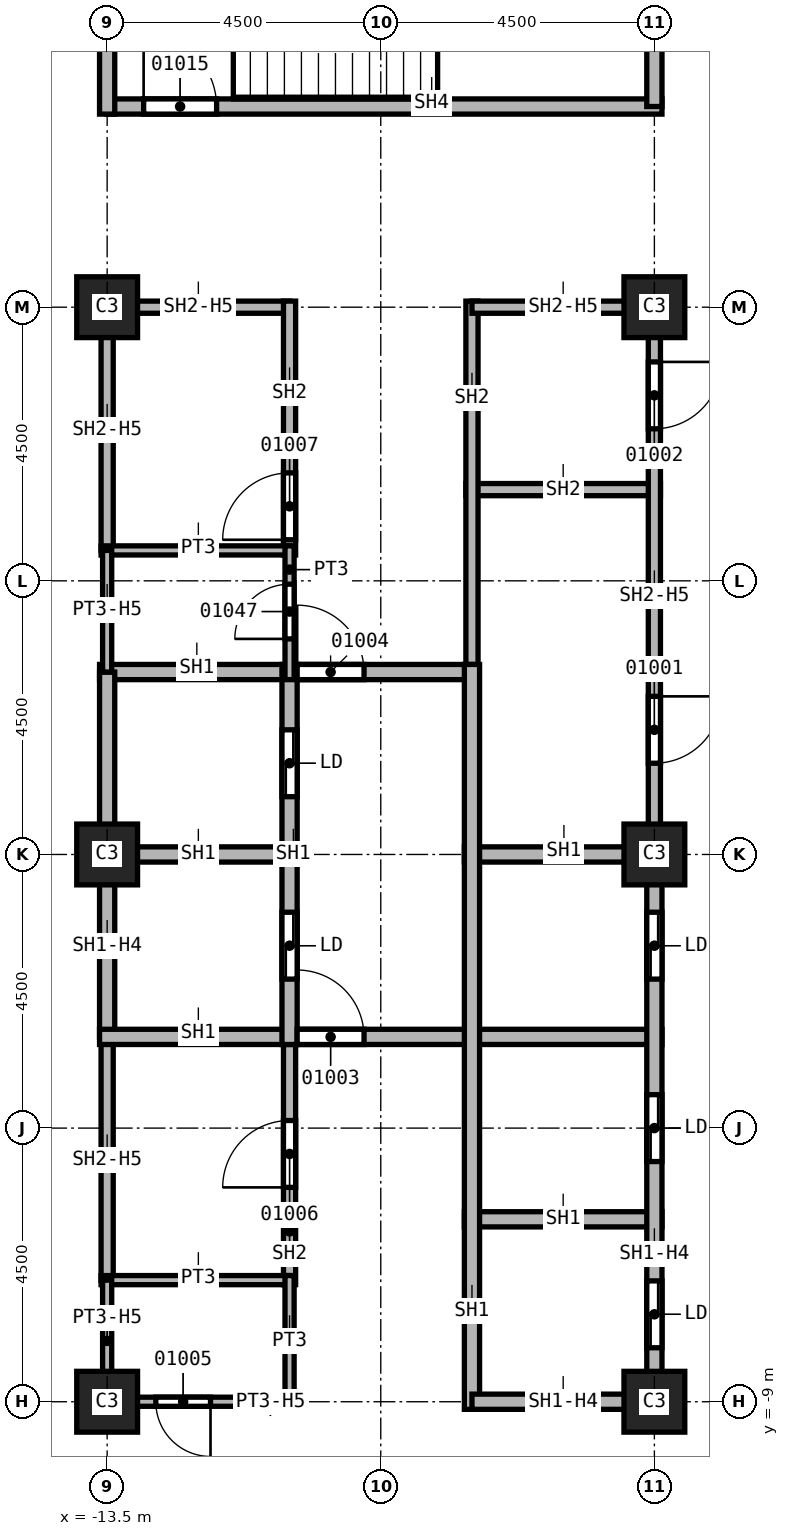
"""IFC4 building model, lengths in metres.
Left out: names, types, materials, properties, quantities, classifications, styles, units other than length and angle.
Written with IfcOpenShell. Run it as: python <this file> out.ifc"""

import sys

from ifc_helpers import new_model, si_unit, direction, frame, frame_2d, origin, origin_2d, place, context, subcontext, project, spatial, rectangle, extrude, element, fill, save


model = new_model("IFC4")
c1 = context("Model", 3, precision=1e-05, world=origin(), true_north=direction((0.0, 1.0)))
c2 = subcontext(c1, "Body", "Model", "MODEL_VIEW")
j1 = project(units=[si_unit("LENGTHUNIT", "METRE"), si_unit("PLANEANGLEUNIT", "RADIAN")], contexts=[c1])
p1 = place(None, origin())
s1 = spatial("IfcSite", under=j1, at=p1, CompositionType="ELEMENT")
p2 = place(p1, origin())
s2 = spatial("IfcBuilding", under=s1, at=p2, CompositionType="ELEMENT")
p3 = place(p2, frame((0.0, 0.0, 72.0)))
s3 = spatial("IfcBuildingStorey", under=s2, at=p3, CompositionType="ELEMENT", Elevation=72.0)
for number, where, z_axis, x_axis in (
    (1, (-4.5, 0.0, 0.0), (0.0, 0.0, 1.0), (1.0, 0.0, 0.0)),
    (2, (-4.5, 9.0, 0.0), (0.0, 0.0, 1.0), (1.0, 0.0, 0.0)),
    (3, (-4.5, -9.0, 0.0), (0.0, 0.0, 1.0), (1.0, 0.0, 0.0)),
    (4, (-13.5, 0.0, 0.0), (0.0, 0.0, 1.0), (1.0, 0.0, 0.0)),
    (5, (-13.5, 9.0, 0.0), (0.0, 0.0, 1.0), (1.0, 0.0, 0.0)),
    (6, (-13.5, -9.0, 0.0), (0.0, 0.0, 1.0), (1.0, 0.0, 0.0)),
):
    element("IfcColumn", number, at=place(p3, frame(where, z_axis=z_axis, x_axis=x_axis)), inside=s3, PredefinedType="COLUMN", context=c2, shape_type="SweptSolid", body=[
        extrude(rectangle(XDim=1.0, YDim=1.0, at=origin_2d()), origin(), (0.0, 0.0, 1.0), 3.7),
    ])
p4 = place(p3, frame((-13.5, -7.0, 0.0), z_axis=(0.0, 0.0, 1.0), x_axis=(0.0, 1.0, 0.0)))
e7 = element("IfcWall", 7, at=p4, inside=s3, PredefinedType="SOLIDWALL", context=c2, shape_type="SweptSolid", body=[
    extrude(rectangle(XDim=4.0, YDim=0.2, at=frame_2d((2.0, 0.0))), origin(), (0.0, 0.0, 1.0), 2.938),
])
p5 = place(p3, frame((-13.5, 5.0, 0.0), z_axis=(0.0, 0.0, 1.0), x_axis=(0.0, 1.0, 0.0)))
e8 = element("IfcWall", 8, at=p5, inside=s3, PredefinedType="SOLIDWALL", context=c2, shape_type="SweptSolid", body=[
    extrude(rectangle(XDim=4.1, YDim=0.2, at=frame_2d((2.05, 0.0))), origin(), (0.0, 0.0, 1.0), 2.938),
])
p6 = place(p3, frame((-13.5, 9.0, 0.0), z_axis=(0.0, 0.0, 1.0), x_axis=(1.0, 0.0, 0.0)))
e9 = element("IfcWall", 9, at=p6, inside=s3, PredefinedType="SOLIDWALL", context=c2, shape_type="SweptSolid", body=[
    extrude(rectangle(XDim=3.0, YDim=0.2, at=frame_2d((1.5, 0.0))), origin(), (0.0, 0.0, 1.0), 2.938),
])
p7 = place(p3, frame((-10.5, -7.075, 0.0), z_axis=(0.0, 0.0, 1.0), x_axis=(0.0, 1.0, 0.0)))
e10 = element("IfcWall", 10, at=p7, inside=s3, PredefinedType="SOLIDWALL", context=c2, shape_type="SweptSolid", body=[
    extrude(rectangle(XDim=4.2, YDim=0.2, at=frame_2d((2.1, 0.0))), origin(), (0.0, 0.0, 1.0), 3.7),
])
p8 = place(p7, frame((1.6, 0.0, 0.0)))
e11 = element("IfcOpeningElement", 11, at=p8, cuts=e10, PredefinedType="OPENING", context=c2, shape_type="SweptSolid", body=[
    extrude(rectangle(XDim=1.1, YDim=2.1, at=frame_2d((0.55, 1.05))), frame((0.0, 0.1, 0.0), z_axis=(0.0, -1.0, 0.0), x_axis=(1.0, 0.0, 0.0)), (0.0, 0.0, 1.0), 0.2),
])
p9 = place(p3, frame((-10.5, 4.925, 0.0), z_axis=(0.0, 0.0, 1.0), x_axis=(0.0, 1.0, 0.0)))
e12 = element("IfcWall", 12, at=p9, inside=s3, PredefinedType="SOLIDWALL", context=c2, shape_type="SweptSolid", body=[
    extrude(rectangle(XDim=4.175, YDim=0.2, at=frame_2d((2.087, 0.0))), origin(), (0.0, 0.0, 1.0), 3.7),
])
p10 = place(p9, frame((0.25, 0.0, 0.0)))
e13 = element("IfcOpeningElement", 13, at=p10, cuts=e12, PredefinedType="OPENING", context=c2, shape_type="SweptSolid", body=[
    extrude(rectangle(XDim=1.1, YDim=2.1, at=frame_2d((0.55, 1.05))), frame((0.0, 0.1, 0.0), z_axis=(0.0, -1.0, 0.0), x_axis=(1.0, 0.0, 0.0)), (0.0, 0.0, 1.0), 0.2),
])
p11 = place(p3, frame((-7.6, 6.0, 0.0), z_axis=(0.0, 0.0, 1.0), x_axis=(1.0, 0.0, 0.0)))
e14 = element("IfcWall", 14, at=p11, inside=s3, PredefinedType="SOLIDWALL", context=c2, shape_type="SweptSolid", body=[
    extrude(rectangle(XDim=3.2, YDim=0.2, at=frame_2d((1.6, 0.0))), origin(), (0.0, 0.0, 1.0), 3.7),
])
p12 = place(p3, frame((-7.5, 2.875, 0.0), z_axis=(0.0, 0.0, 1.0), x_axis=(0.0, 1.0, 0.0)))
e15 = element("IfcWall", 15, at=p12, inside=s3, PredefinedType="SOLIDWALL", context=c2, shape_type="SweptSolid", body=[
    extrude(rectangle(XDim=6.225, YDim=0.2, at=frame_2d((3.113, 0.0))), origin(), (0.0, 0.0, 1.0), 3.7),
])
p13 = place(p3, frame((-7.5, 9.0, 0.0), z_axis=(0.0, 0.0, 1.0), x_axis=(1.0, 0.0, 0.0)))
e16 = element("IfcWall", 16, at=p13, inside=s3, PredefinedType="SOLIDWALL", context=c2, shape_type="SweptSolid", body=[
    extrude(rectangle(XDim=3.0, YDim=0.2, at=frame_2d((1.5, 0.0))), origin(), (0.0, 0.0, 1.0), 2.938),
])
p14 = place(p3, frame((-4.5, 9.1, 0.0), z_axis=(0.0, 0.0, 1.0), x_axis=(0.0, -1.0, 0.0)))
e17 = element("IfcWall", 17, at=p14, inside=s3, PredefinedType="SOLIDWALL", context=c2, shape_type="SweptSolid", body=[
    extrude(rectangle(XDim=9.1, YDim=0.2, at=frame_2d((4.55, 0.0))), origin(), (0.0, 0.0, 1.0), 2.938),
])
p15 = place(p14, frame((6.5, 0.0, 0.0)))
e18 = element("IfcOpeningElement", 18, at=p15, cuts=e17, PredefinedType="OPENING", context=c2, shape_type="SweptSolid", body=[
    extrude(rectangle(XDim=1.1, YDim=2.1, at=frame_2d((0.55, 1.05))), frame((0.0, 0.1, 0.0), z_axis=(0.0, -1.0, 0.0), x_axis=(1.0, 0.0, 0.0)), (0.0, 0.0, 1.0), 0.2),
])
p16 = place(p14, frame((1.0, 0.0, 0.0)))
e19 = element("IfcOpeningElement", 19, at=p16, cuts=e17, PredefinedType="OPENING", context=c2, shape_type="SweptSolid", body=[
    extrude(rectangle(XDim=1.1, YDim=2.1, at=frame_2d((0.55, 1.05))), frame((0.0, 0.1, 0.0), z_axis=(0.0, -1.0, 0.0), x_axis=(1.0, 0.0, 0.0)), (0.0, 0.0, 1.0), 0.2),
])
p17 = place(p3, frame((-13.625, 0.0, 0.0), z_axis=(0.0, 0.0, 1.0), x_axis=(1.0, 0.0, 0.0)))
e20 = element("IfcWall", 20, at=p17, inside=s3, PredefinedType="SOLIDWALL", context=c2, shape_type="SweptSolid", body=[
    extrude(rectangle(XDim=3.125, YDim=0.25, at=frame_2d((1.562, 0.0))), origin(), (0.0, 0.0, 1.0), 3.7),
])
p18 = place(p3, frame((-13.625, 3.0, 0.0), z_axis=(0.0, 0.0, 1.0), x_axis=(1.0, 0.0, 0.0)))
e21 = element("IfcWall", 21, at=p18, inside=s3, PredefinedType="SOLIDWALL", context=c2, shape_type="SweptSolid", body=[
    extrude(rectangle(XDim=6.125, YDim=0.25, at=frame_2d((3.062, 0.0))), origin(), (0.0, 0.0, 1.0), 3.7),
])
p19 = place(p18, frame((3.25, 0.0, 0.0)))
e22 = element("IfcOpeningElement", 22, at=p19, cuts=e21, PredefinedType="OPENING", context=c2, shape_type="SweptSolid", body=[
    extrude(rectangle(XDim=1.1, YDim=2.1, at=frame_2d((0.55, 1.05))), frame((0.0, 0.125, 0.0), z_axis=(0.0, -1.0, 0.0), x_axis=(1.0, 0.0, 0.0)), (0.0, 0.0, 1.0), 0.25),
])
p20 = place(p3, frame((-13.5, -3.0, 0.0), z_axis=(0.0, 0.0, 1.0), x_axis=(0.0, 1.0, 0.0)))
e23 = element("IfcWall", 23, at=p20, inside=s3, PredefinedType="SOLIDWALL", context=c2, shape_type="SweptSolid", body=[
    extrude(rectangle(XDim=6.0, YDim=0.25, at=frame_2d((3.0, 0.0))), origin(), (0.0, 0.0, 1.0), 2.938),
])
p21 = place(p3, frame((-13.625, -3.0, 0.0), z_axis=(0.0, 0.0, 1.0), x_axis=(1.0, 0.0, 0.0)))
e24 = element("IfcWall", 24, at=p21, inside=s3, PredefinedType="SOLIDWALL", context=c2, shape_type="SweptSolid", body=[
    extrude(rectangle(XDim=9.25, YDim=0.25, at=frame_2d((4.625, 0.0))), origin(), (0.0, 0.0, 1.0), 3.7),
])
p22 = place(p21, frame((3.25, 0.0, 0.0)))
e25 = element("IfcOpeningElement", 25, at=p22, cuts=e24, PredefinedType="OPENING", context=c2, shape_type="SweptSolid", body=[
    extrude(rectangle(XDim=1.1, YDim=2.1, at=frame_2d((0.55, 1.05))), frame((0.0, 0.125, 0.0), z_axis=(0.0, -1.0, 0.0), x_axis=(1.0, 0.0, 0.0)), (0.0, 0.0, 1.0), 0.25),
])
p23 = place(p3, frame((-10.5, -3.125, 0.0), z_axis=(0.0, 0.0, 1.0), x_axis=(0.0, 1.0, 0.0)))
e26 = element("IfcWall", 26, at=p23, inside=s3, PredefinedType="SOLIDWALL", context=c2, shape_type="SweptSolid", body=[
    extrude(rectangle(XDim=6.25, YDim=0.25, at=frame_2d((3.125, 0.0))), origin(), (0.0, 0.0, 1.0), 3.7),
])
p24 = place(p23, frame((1.075, 0.0, 0.0)))
e27 = element("IfcOpeningElement", 27, at=p24, cuts=e26, PredefinedType="OPENING", context=c2, shape_type="SweptSolid", body=[
    extrude(rectangle(XDim=1.1, YDim=2.1, at=frame_2d((0.55, 1.05))), frame((0.0, 0.125, 0.0), z_axis=(0.0, -1.0, 0.0), x_axis=(1.0, 0.0, 0.0)), (0.0, 0.0, 1.0), 0.25),
])
p25 = place(p23, frame((4.075, 0.0, 0.0)))
e28 = element("IfcOpeningElement", 28, at=p25, cuts=e26, PredefinedType="OPENING", context=c2, shape_type="SweptSolid", body=[
    extrude(rectangle(XDim=1.1, YDim=2.1, at=frame_2d((0.55, 1.05))), frame((0.0, 0.125, 0.0), z_axis=(0.0, -1.0, 0.0), x_axis=(1.0, 0.0, 0.0)), (0.0, 0.0, 1.0), 0.25),
])
for number, where, z_axis, x_axis in (
    (29, (-7.625, -6.0, 0.0), (0.0, 0.0, 1.0), (1.0, 0.0, 0.0)),
    (30, (-7.625, 0.0, 0.0), (0.0, 0.0, 1.0), (1.0, 0.0, 0.0)),
):
    element("IfcWall", number, at=place(p3, frame(where, z_axis=z_axis, x_axis=x_axis)), inside=s3, PredefinedType="SOLIDWALL", context=c2, shape_type="SweptSolid", body=[
        extrude(rectangle(XDim=3.25, YDim=0.25, at=frame_2d((1.625, 0.0))), origin(), (0.0, 0.0, 1.0), 3.7),
    ])
p26 = place(p3, frame((-7.5, -9.125, 0.0), z_axis=(0.0, 0.0, 1.0), x_axis=(0.0, 1.0, 0.0)))
e31 = element("IfcWall", 31, at=p26, inside=s3, PredefinedType="SOLIDWALL", context=c2, shape_type="SweptSolid", body=[
    extrude(rectangle(XDim=12.25, YDim=0.25, at=frame_2d((6.125, 0.0))), origin(), (0.0, 0.0, 1.0), 3.7),
])
p27 = place(p3, frame((-4.5, -9.0, 0.0), z_axis=(0.0, 0.0, 1.0), x_axis=(-1.0, 0.0, 0.0)))
e32 = element("IfcWall", 32, at=p27, inside=s3, PredefinedType="SOLIDWALL", context=c2, shape_type="SweptSolid", body=[
    extrude(rectangle(XDim=3.0, YDim=0.25, at=frame_2d((1.5, 0.0))), origin(), (0.0, 0.0, 1.0), 2.938),
])
p28 = place(p3, frame((-4.5, 0.0, 0.0), z_axis=(0.0, 0.0, 1.0), x_axis=(0.0, -1.0, 0.0)))
e33 = element("IfcWall", 33, at=p28, inside=s3, PredefinedType="SOLIDWALL", context=c2, shape_type="SweptSolid", body=[
    extrude(rectangle(XDim=9.125, YDim=0.25, at=frame_2d((4.562, 0.0))), origin(), (0.0, 0.0, 1.0), 2.938),
])
p29 = place(p28, frame((7.012, 0.0, 0.0)))
e34 = element("IfcOpeningElement", 34, at=p29, cuts=e33, PredefinedType="OPENING", context=c2, shape_type="SweptSolid", body=[
    extrude(rectangle(XDim=1.1, YDim=2.1, at=frame_2d((0.55, 1.05))), frame((0.0, 0.125, 0.0), z_axis=(0.0, -1.0, 0.0), x_axis=(1.0, 0.0, 0.0)), (0.0, 0.0, 1.0), 0.25),
])
p30 = place(p28, frame((3.95, 0.0, 0.0)))
e35 = element("IfcOpeningElement", 35, at=p30, cuts=e33, PredefinedType="OPENING", context=c2, shape_type="SweptSolid", body=[
    extrude(rectangle(XDim=1.1, YDim=2.1, at=frame_2d((0.55, 1.05))), frame((0.0, 0.125, 0.0), z_axis=(0.0, -1.0, 0.0), x_axis=(1.0, 0.0, 0.0)), (0.0, 0.0, 1.0), 0.25),
])
p31 = place(p28, frame((0.95, 0.0, 0.0)))
e36 = element("IfcOpeningElement", 36, at=p31, cuts=e33, PredefinedType="OPENING", context=c2, shape_type="SweptSolid", body=[
    extrude(rectangle(XDim=1.1, YDim=2.1, at=frame_2d((0.55, 1.05))), frame((0.0, 0.125, 0.0), z_axis=(0.0, -1.0, 0.0), x_axis=(1.0, 0.0, 0.0)), (0.0, 0.0, 1.0), 0.25),
])
p32 = place(p3, frame((-13.5, 12.3, 0.0), z_axis=(0.0, 0.0, 1.0), x_axis=(1.0, 0.0, 0.0)))
e37 = element("IfcWall", 37, at=p32, inside=s3, PredefinedType="SOLIDWALL", context=c2, shape_type="SweptSolid", body=[
    extrude(rectangle(XDim=9.125, YDim=0.25, at=frame_2d((4.562, 0.0))), origin(), (0.0, 0.0, 1.0), 3.7),
])
p33 = place(p32, frame((0.6, 0.0, 0.0)))
e38 = element("IfcOpeningElement", 38, at=p33, cuts=e37, PredefinedType="OPENING", context=c2, shape_type="SweptSolid", body=[
    extrude(rectangle(XDim=1.2, YDim=2.1, at=frame_2d((0.6, 1.05))), frame((0.0, 0.125, 0.0), z_axis=(0.0, -1.0, 0.0), x_axis=(1.0, 0.0, 0.0)), (0.0, 0.0, 1.0), 0.25),
])
p34 = place(p3, frame((-13.5, 12.175, 0.0), z_axis=(0.0, 0.0, 1.0), x_axis=(0.0, 1.0, 0.0)))
e39 = element("IfcWall", 39, at=p34, inside=s3, PredefinedType="SOLIDWALL", context=c2, shape_type="SweptSolid", body=[
    extrude(rectangle(XDim=4.75, YDim=0.25, at=frame_2d((2.375, 0.0))), origin(), (0.0, 0.0, 1.0), 3.7),
])
p35 = place(p3, frame((-4.5, 16.8, 0.0), z_axis=(0.0, 0.0, 1.0), x_axis=(0.0, -1.0, 0.0)))
e40 = element("IfcWall", 40, at=p35, inside=s3, PredefinedType="SOLIDWALL", context=c2, shape_type="SweptSolid", body=[
    extrude(rectangle(XDim=4.5, YDim=0.25, at=frame_2d((2.25, 0.0))), origin(), (0.0, 0.0, 1.0), 3.7),
])
for number, where, z_axis, x_axis in (
    (41, (-13.6, -7.0, 0.0), (0.0, 0.0, 1.0), (1.0, 0.0, 0.0)),
    (42, (-13.6, 5.0, 0.0), (0.0, 0.0, 1.0), (1.0, 0.0, 0.0)),
):
    element("IfcWall", number, at=place(p3, frame(where, z_axis=z_axis, x_axis=x_axis)), inside=s3, PredefinedType="PARTITIONING", context=c2, shape_type="SweptSolid", body=[
        extrude(rectangle(XDim=3.1, YDim=0.15, at=frame_2d((1.55, 0.0))), origin(), (0.0, 0.0, 1.0), 3.7),
    ])
p36 = place(p3, frame((-13.5, -9.075, 0.0), z_axis=(0.0, 0.0, 1.0), x_axis=(0.0, 1.0, 0.0)))
e43 = element("IfcWall", 43, at=p36, inside=s3, PredefinedType="PARTITIONING", context=c2, shape_type="SweptSolid", body=[
    extrude(rectangle(XDim=2.075, YDim=0.15, at=frame_2d((1.038, 0.0))), origin(), (0.0, 0.0, 1.0), 2.938),
])
p37 = place(p3, frame((-13.5, 3.0, 0.0), z_axis=(0.0, 0.0, 1.0), x_axis=(0.0, 1.0, 0.0)))
e44 = element("IfcWall", 44, at=p37, inside=s3, PredefinedType="PARTITIONING", context=c2, shape_type="SweptSolid", body=[
    extrude(rectangle(XDim=2.0, YDim=0.15, at=frame_2d((1.0, 0.0))), origin(), (0.0, 0.0, 1.0), 2.938),
])
p38 = place(p3, frame((-10.5, -9.075, 0.0), z_axis=(0.0, 0.0, 1.0), x_axis=(0.0, 1.0, 0.0)))
e45 = element("IfcWall", 45, at=p38, inside=s3, PredefinedType="PARTITIONING", context=c2, shape_type="SweptSolid", body=[
    extrude(rectangle(XDim=2.15, YDim=0.15, at=frame_2d((1.075, 0.0))), origin(), (0.0, 0.0, 1.0), 3.7),
])
p39 = place(p3, frame((-10.5, -9.0, 0.0), z_axis=(0.0, 0.0, 1.0), x_axis=(-1.0, 0.0, 0.0)))
e46 = element("IfcWall", 46, at=p39, inside=s3, PredefinedType="PARTITIONING", context=c2, shape_type="SweptSolid", body=[
    extrude(rectangle(XDim=3.0, YDim=0.15, at=frame_2d((1.5, 0.0))), origin(), (0.0, 0.0, 1.0), 2.938),
])
p40 = place(p39, frame((1.3, 0.0, 0.0)))
e47 = element("IfcOpeningElement", 47, at=p40, cuts=e46, PredefinedType="OPENING", context=c2, shape_type="SweptSolid", body=[
    extrude(rectangle(XDim=0.9, YDim=2.1, at=frame_2d((0.45, 1.05))), frame((0.0, 0.075, 0.0), z_axis=(0.0, -1.0, 0.0), x_axis=(1.0, 0.0, 0.0)), (0.0, 0.0, 1.0), 0.15),
])
p41 = place(p3, frame((-10.5, 2.875, 0.0), z_axis=(0.0, 0.0, 1.0), x_axis=(0.0, 1.0, 0.0)))
e48 = element("IfcWall", 48, at=p41, inside=s3, PredefinedType="PARTITIONING", context=c2, shape_type="SweptSolid", body=[
    extrude(rectangle(XDim=2.2, YDim=0.15, at=frame_2d((1.1, 0.0))), origin(), (0.0, 0.0, 1.0), 3.7),
])
p42 = place(p41, frame((0.67, 0.0, 0.0)))
e49 = element("IfcOpeningElement", 49, at=p42, cuts=e48, PredefinedType="OPENING", context=c2, shape_type="SweptSolid", body=[
    extrude(rectangle(XDim=0.9, YDim=2.1, at=frame_2d((0.45, 1.05))), frame((0.0, 0.075, 0.0), z_axis=(0.0, -1.0, 0.0), x_axis=(1.0, 0.0, 0.0)), (0.0, 0.0, 1.0), 0.15),
])
p43 = place(p15, origin())
e50 = element("IfcDoor", 50, at=p43, inside=s3, OperationType="SINGLE_SWING_RIGHT", PredefinedType="DOOR", context=c2, shape_type="SweptSolid", body=[
    extrude(rectangle(XDim=1.1, YDim=2.1, at=frame_2d((0.55, 1.05))), frame((0.0, 0.025, 0.0), z_axis=(0.0, -1.0, 0.0), x_axis=(1.0, 0.0, 0.0)), (0.0, 0.0, 1.0), 0.05),
])
fill(e18, e50)
p44 = place(p16, origin())
e51 = element("IfcDoor", 51, at=p44, inside=s3, OperationType="SINGLE_SWING_LEFT", PredefinedType="DOOR", context=c2, shape_type="SweptSolid", body=[
    extrude(rectangle(XDim=1.1, YDim=2.1, at=frame_2d((0.55, 1.05))), frame((0.0, 0.025, 0.0), z_axis=(0.0, -1.0, 0.0), x_axis=(1.0, 0.0, 0.0)), (0.0, 0.0, 1.0), 0.05),
])
fill(e19, e51)
p45 = place(p22, origin())
e52 = element("IfcDoor", 52, at=p45, inside=s3, OperationType="SINGLE_SWING_RIGHT", PredefinedType="DOOR", context=c2, shape_type="SweptSolid", body=[
    extrude(rectangle(XDim=1.1, YDim=2.1, at=frame_2d((0.55, 1.05))), frame((0.0, 0.025, 0.0), z_axis=(0.0, -1.0, 0.0), x_axis=(1.0, 0.0, 0.0)), (0.0, 0.0, 1.0), 0.05),
])
fill(e25, e52)
p46 = place(p19, origin())
e53 = element("IfcDoor", 53, at=p46, inside=s3, OperationType="SINGLE_SWING_LEFT", PredefinedType="DOOR", context=c2, shape_type="SweptSolid", body=[
    extrude(rectangle(XDim=1.1, YDim=2.1, at=frame_2d((0.55, 1.05))), frame((0.0, 0.025, 0.0), z_axis=(0.0, -1.0, 0.0), x_axis=(1.0, 0.0, 0.0)), (0.0, 0.0, 1.0), 0.05),
])
fill(e22, e53)
p47 = place(p40, origin())
e54 = element("IfcDoor", 54, at=p47, inside=s3, OperationType="SINGLE_SWING_RIGHT", PredefinedType="DOOR", context=c2, shape_type="SweptSolid", body=[
    extrude(rectangle(XDim=0.9, YDim=2.1, at=frame_2d((0.45, 1.05))), frame((0.0, 0.025, 0.0), z_axis=(0.0, -1.0, 0.0), x_axis=(1.0, 0.0, 0.0)), (0.0, 0.0, 1.0), 0.05),
])
fill(e47, e54)
p48 = place(p8, origin())
e55 = element("IfcDoor", 55, at=p48, inside=s3, OperationType="SINGLE_SWING_LEFT", PredefinedType="DOOR", context=c2, shape_type="SweptSolid", body=[
    extrude(rectangle(XDim=1.1, YDim=2.1, at=frame_2d((0.55, 1.05))), frame((0.0, 0.025, 0.0), z_axis=(0.0, -1.0, 0.0), x_axis=(1.0, 0.0, 0.0)), (0.0, 0.0, 1.0), 0.05),
])
fill(e11, e55)
p49 = place(p10, origin())
e56 = element("IfcDoor", 56, at=p49, inside=s3, OperationType="SINGLE_SWING_RIGHT", PredefinedType="DOOR", context=c2, shape_type="SweptSolid", body=[
    extrude(rectangle(XDim=1.1, YDim=2.1, at=frame_2d((0.55, 1.05))), frame((0.0, 0.025, 0.0), z_axis=(0.0, -1.0, 0.0), x_axis=(1.0, 0.0, 0.0)), (0.0, 0.0, 1.0), 0.05),
])
fill(e13, e56)
p50 = place(p33, origin())
e57 = element("IfcDoor", 57, at=p50, inside=s3, OperationType="SINGLE_SWING_RIGHT", PredefinedType="DOOR", context=c2, shape_type="SweptSolid", body=[
    extrude(rectangle(XDim=1.2, YDim=2.1, at=frame_2d((0.6, 1.05))), frame((0.0, 0.025, 0.0), z_axis=(0.0, -1.0, 0.0), x_axis=(1.0, 0.0, 0.0)), (0.0, 0.0, 1.0), 0.05),
])
fill(e38, e57)
p51 = place(p42, origin())
e58 = element("IfcDoor", 58, at=p51, inside=s3, OperationType="SINGLE_SWING_LEFT", PredefinedType="DOOR", context=c2, shape_type="SweptSolid", body=[
    extrude(rectangle(XDim=0.9, YDim=2.1, at=frame_2d((0.45, 1.05))), frame((0.0, 0.025, 0.0), z_axis=(0.0, -1.0, 0.0), x_axis=(1.0, 0.0, 0.0)), (0.0, 0.0, 1.0), 0.05),
])
fill(e49, e58)
p52 = place(p29, origin())
e59 = element("IfcDoor", 59, at=p52, inside=s3, OperationType="SLIDING_TO_LEFT", PredefinedType="DOOR", context=c2, shape_type="SweptSolid", body=[
    extrude(rectangle(XDim=1.1, YDim=2.1, at=frame_2d((0.55, 1.05))), frame((0.0, 0.025, 0.0), z_axis=(0.0, -1.0, 0.0), x_axis=(1.0, 0.0, 0.0)), (0.0, 0.0, 1.0), 0.05),
])
fill(e34, e59)
p53 = place(p30, origin())
e60 = element("IfcDoor", 60, at=p53, inside=s3, OperationType="SLIDING_TO_LEFT", PredefinedType="DOOR", context=c2, shape_type="SweptSolid", body=[
    extrude(rectangle(XDim=1.1, YDim=2.1, at=frame_2d((0.55, 1.05))), frame((0.0, 0.025, 0.0), z_axis=(0.0, -1.0, 0.0), x_axis=(1.0, 0.0, 0.0)), (0.0, 0.0, 1.0), 0.05),
])
fill(e35, e60)
p54 = place(p31, origin())
e61 = element("IfcDoor", 61, at=p54, inside=s3, OperationType="SLIDING_TO_LEFT", PredefinedType="DOOR", context=c2, shape_type="SweptSolid", body=[
    extrude(rectangle(XDim=1.1, YDim=2.1, at=frame_2d((0.55, 1.05))), frame((0.0, 0.025, 0.0), z_axis=(0.0, -1.0, 0.0), x_axis=(1.0, 0.0, 0.0)), (0.0, 0.0, 1.0), 0.05),
])
fill(e36, e61)
p55 = place(p24, origin())
e62 = element("IfcDoor", 62, at=p55, inside=s3, OperationType="SLIDING_TO_LEFT", PredefinedType="DOOR", context=c2, shape_type="SweptSolid", body=[
    extrude(rectangle(XDim=1.1, YDim=2.1, at=frame_2d((0.55, 1.05))), frame((0.0, 0.025, 0.0), z_axis=(0.0, -1.0, 0.0), x_axis=(1.0, 0.0, 0.0)), (0.0, 0.0, 1.0), 0.05),
])
fill(e27, e62)
p56 = place(p25, origin())
e63 = element("IfcDoor", 63, at=p56, inside=s3, OperationType="SLIDING_TO_LEFT", PredefinedType="DOOR", context=c2, shape_type="SweptSolid", body=[
    extrude(rectangle(XDim=1.1, YDim=2.1, at=frame_2d((0.55, 1.05))), frame((0.0, 0.025, 0.0), z_axis=(0.0, -1.0, 0.0), x_axis=(1.0, 0.0, 0.0)), (0.0, 0.0, 1.0), 0.05),
])
fill(e28, e63)
save(model, sys.argv[1])
